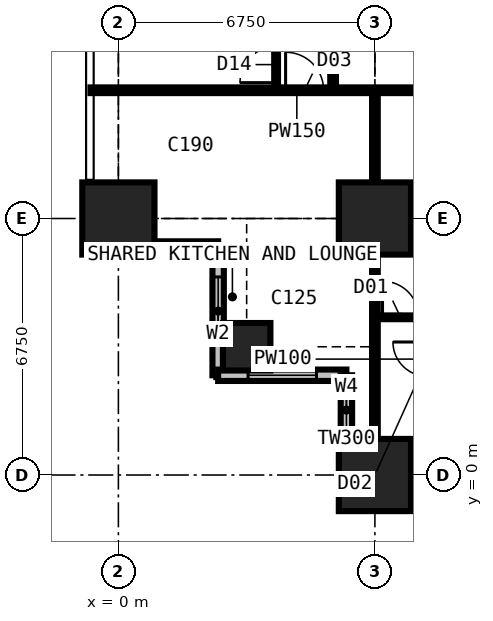
"""IFC4 building model, lengths in metres.
Left out: names, types, materials, properties, quantities, classifications, styles, units other than length and angle.
Written with IfcOpenShell. Run it as: python <this file> out.ifc"""

import sys

from ifc_helpers import new_model, si_unit, direction, frame, frame_2d, origin, origin_2d, place, context, subcontext, project, spatial, rectangle, extrude, element, fill, save


model = new_model("IFC4")
c1 = context("Model", 3, precision=1e-05, world=origin(), true_north=direction((0.0, 1.0)))
c2 = subcontext(c1, "Body", "Model", "MODEL_VIEW")
j1 = project(units=[si_unit("LENGTHUNIT", "METRE"), si_unit("PLANEANGLEUNIT", "RADIAN")], contexts=[c1])
p1 = place(None, origin())
s1 = spatial("IfcSite", under=j1, at=p1, CompositionType="ELEMENT")
p2 = place(p1, origin())
s2 = spatial("IfcBuilding", under=s1, at=p2, CompositionType="ELEMENT")
p3 = place(p2, frame((0.0, 0.0, 36.0)))
s3 = spatial("IfcBuildingStorey", under=s2, at=p3, CompositionType="ELEMENT", Elevation=36.0)
p4 = place(p3, frame((0.0, 6.75, 0.0), z_axis=(0.0, 0.0, 1.0), x_axis=(1.0, 0.0, 0.0)))
e1 = element("IfcColumn", 1, at=p4, inside=s3, PredefinedType="COLUMN", context=c2, shape_type="SweptSolid", body=[
    extrude(rectangle(XDim=1.9, YDim=1.9, at=origin_2d()), origin(), (0.0, 0.0, 1.0), 3.6),
])
p5 = place(p3, frame((3.375, 3.375, 0.0), z_axis=(0.0, 0.0, 1.0), x_axis=(1.0, 0.0, 0.0)))
e2 = element("IfcColumn", 2, at=p5, inside=s3, PredefinedType="COLUMN", context=c2, shape_type="SweptSolid", body=[
    extrude(rectangle(XDim=1.25, YDim=1.25, at=origin_2d()), origin(), (0.0, 0.0, 1.0), 3.6),
])
for number, where, z_axis, x_axis in (
    (3, (6.75, 0.0, 0.0), (0.0, 0.0, 1.0), (1.0, 0.0, 0.0)),
    (4, (6.75, 6.75, 0.0), (0.0, 0.0, 1.0), (1.0, 0.0, 0.0)),
):
    element("IfcColumn", number, at=place(p3, frame(where, z_axis=z_axis, x_axis=x_axis)), inside=s3, PredefinedType="COLUMN", context=c2, shape_type="SweptSolid", body=[
        extrude(rectangle(XDim=1.9, YDim=1.9, at=origin_2d()), origin(), (0.0, 0.0, 1.0), 3.6),
    ])
p6 = place(p3, frame((-0.75, 6.0, 0.0), z_axis=(0.0, 0.0, 1.0), x_axis=(1.0, 0.0, 0.0)))
e5 = element("IfcWall", 5, at=p6, inside=s3, PredefinedType="SOLIDWALL", context=c2, shape_type="SweptSolid", body=[
    extrude(rectangle(XDim=3.375, YDim=0.3, at=frame_2d((1.688, 0.0))), origin(), (0.0, 0.0, 1.0), 3.375),
])
p7 = place(p6, frame((1.857, 0.0, 0.9)))
e6 = element("IfcOpeningElement", 6, at=p7, cuts=e5, PredefinedType="OPENING", context=c2, shape_type="SweptSolid", body=[
    extrude(rectangle(XDim=1.2, YDim=1.8, at=frame_2d((0.6, 0.9))), frame((0.0, 0.16, 0.0), z_axis=(0.0, -1.0, 0.0), x_axis=(1.0, 0.0, 0.0)), (0.0, 0.0, 1.0), 0.32),
])
p8 = place(p3, frame((2.625, 6.0, 0.0), z_axis=(0.0, 0.0, 1.0), x_axis=(0.0, -1.0, 0.0)))
e7 = element("IfcWall", 7, at=p8, inside=s3, PredefinedType="SOLIDWALL", context=c2, shape_type="SweptSolid", body=[
    extrude(rectangle(XDim=3.375, YDim=0.3, at=frame_2d((1.688, 0.0))), origin(), (0.0, 0.0, 1.0), 3.375),
])
p9 = place(p8, frame((0.788, 0.0, 0.6)))
e8 = element("IfcOpeningElement", 8, at=p9, cuts=e7, PredefinedType="OPENING", context=c2, shape_type="SweptSolid", body=[
    extrude(rectangle(XDim=1.8, YDim=2.1, at=frame_2d((0.9, 1.05))), frame((0.0, 0.16, 0.0), z_axis=(0.0, -1.0, 0.0), x_axis=(1.0, 0.0, 0.0)), (0.0, 0.0, 1.0), 0.32),
])
p10 = place(p3, frame((2.625, 2.625, 0.0), z_axis=(0.0, 0.0, 1.0), x_axis=(1.0, 0.0, 0.0)))
e9 = element("IfcWall", 9, at=p10, inside=s3, PredefinedType="SOLIDWALL", context=c2, shape_type="SweptSolid", body=[
    extrude(rectangle(XDim=3.375, YDim=0.3, at=frame_2d((1.688, 0.0))), origin(), (0.0, 0.0, 1.0), 3.375),
])
p11 = place(p10, frame((0.788, 0.0, 0.6)))
e10 = element("IfcOpeningElement", 10, at=p11, cuts=e9, PredefinedType="OPENING", context=c2, shape_type="SweptSolid", body=[
    extrude(rectangle(XDim=1.8, YDim=2.1, at=frame_2d((0.9, 1.05))), frame((0.0, 0.16, 0.0), z_axis=(0.0, -1.0, 0.0), x_axis=(1.0, 0.0, 0.0)), (0.0, 0.0, 1.0), 0.32),
])
p12 = place(p3, frame((6.0, 2.625, 0.0), z_axis=(0.0, 0.0, 1.0), x_axis=(0.0, -1.0, 0.0)))
e11 = element("IfcWall", 11, at=p12, inside=s3, PredefinedType="SOLIDWALL", context=c2, shape_type="SweptSolid", body=[
    extrude(rectangle(XDim=3.375, YDim=0.3, at=frame_2d((1.688, 0.0))), origin(), (0.0, 0.0, 1.0), 3.375),
])
p13 = place(p12, frame((0.317, 0.0, 0.9)))
e12 = element("IfcOpeningElement", 12, at=p13, cuts=e11, PredefinedType="OPENING", context=c2, shape_type="SweptSolid", body=[
    extrude(rectangle(XDim=1.2, YDim=1.8, at=frame_2d((0.6, 0.9))), frame((0.0, 0.16, 0.0), z_axis=(0.0, -1.0, 0.0), x_axis=(1.0, 0.0, 0.0)), (0.0, 0.0, 1.0), 0.32),
])
p14 = place(p3, frame((-0.734, 10.125, 0.0), z_axis=(0.0, 0.0, 1.0), x_axis=(1.0, 0.0, 0.0)))
e13 = element("IfcWall", 13, at=p14, inside=s3, PredefinedType="PARTITIONING", context=c2, shape_type="SweptSolid", body=[
    extrude(rectangle(XDim=10.859, YDim=0.15, at=frame_2d((5.429, 0.0))), origin(), (0.0, 0.0, 1.0), 3.375),
])
p15 = place(p14, frame((5.134, 0.0, 0.0)))
e14 = element("IfcOpeningElement", 14, at=p15, cuts=e13, PredefinedType="OPENING", context=c2, shape_type="SweptSolid", body=[
    extrude(rectangle(XDim=1.0, YDim=2.2, at=frame_2d((0.5, 1.1))), frame((0.0, 0.085, 0.0), z_axis=(0.0, -1.0, 0.0), x_axis=(1.0, 0.0, 0.0)), (0.0, 0.0, 1.0), 0.17),
])
p16 = place(p3, frame((4.15, 10.125, 0.0), z_axis=(0.0, 0.0, 1.0), x_axis=(0.0, 1.0, 0.0)))
e15 = element("IfcWall", 15, at=p16, inside=s3, PredefinedType="PARTITIONING", context=c2, shape_type="SweptSolid", body=[
    extrude(rectangle(XDim=23.625, YDim=0.1, at=frame_2d((11.812, 0.0))), origin(), (0.0, 0.0, 1.0), 3.375),
])
p17 = place(p16, frame((0.2, 0.0, 0.0)))
e16 = element("IfcOpeningElement", 16, at=p17, cuts=e15, PredefinedType="OPENING", context=c2, shape_type="SweptSolid", body=[
    extrude(rectangle(XDim=0.95, YDim=2.2, at=frame_2d((0.475, 1.1))), frame((0.0, 0.06, 0.0), z_axis=(0.0, -1.0, 0.0), x_axis=(1.0, 0.0, 0.0)), (0.0, 0.0, 1.0), 0.12),
])
p18 = place(p16, frame((3.625, 0.0, 0.0)))
e17 = element("IfcOpeningElement", 17, at=p18, cuts=e15, PredefinedType="OPENING", context=c2, shape_type="SweptSolid", body=[
    extrude(rectangle(XDim=0.95, YDim=2.2, at=frame_2d((0.475, 1.1))), frame((0.0, 0.06, 0.0), z_axis=(0.0, -1.0, 0.0), x_axis=(1.0, 0.0, 0.0)), (0.0, 0.0, 1.0), 0.12),
])
p19 = place(p16, frame((7.0, 0.0, 0.0)))
e18 = element("IfcOpeningElement", 18, at=p19, cuts=e15, PredefinedType="OPENING", context=c2, shape_type="SweptSolid", body=[
    extrude(rectangle(XDim=0.95, YDim=2.2, at=frame_2d((0.475, 1.1))), frame((0.0, 0.06, 0.0), z_axis=(0.0, -1.0, 0.0), x_axis=(1.0, 0.0, 0.0)), (0.0, 0.0, 1.0), 0.12),
])
p20 = place(p16, frame((10.375, 0.0, 0.0)))
e19 = element("IfcOpeningElement", 19, at=p20, cuts=e15, PredefinedType="OPENING", context=c2, shape_type="SweptSolid", body=[
    extrude(rectangle(XDim=0.95, YDim=2.2, at=frame_2d((0.475, 1.1))), frame((0.0, 0.06, 0.0), z_axis=(0.0, -1.0, 0.0), x_axis=(1.0, 0.0, 0.0)), (0.0, 0.0, 1.0), 0.12),
])
p21 = place(p16, frame((13.75, 0.0, 0.0)))
e20 = element("IfcOpeningElement", 20, at=p21, cuts=e15, PredefinedType="OPENING", context=c2, shape_type="SweptSolid", body=[
    extrude(rectangle(XDim=0.95, YDim=2.2, at=frame_2d((0.475, 1.1))), frame((0.0, 0.06, 0.0), z_axis=(0.0, -1.0, 0.0), x_axis=(1.0, 0.0, 0.0)), (0.0, 0.0, 1.0), 0.12),
])
p22 = place(p16, frame((17.125, 0.0, 0.0)))
e21 = element("IfcOpeningElement", 21, at=p22, cuts=e15, PredefinedType="OPENING", context=c2, shape_type="SweptSolid", body=[
    extrude(rectangle(XDim=0.95, YDim=2.2, at=frame_2d((0.475, 1.1))), frame((0.0, 0.06, 0.0), z_axis=(0.0, -1.0, 0.0), x_axis=(1.0, 0.0, 0.0)), (0.0, 0.0, 1.0), 0.12),
])
p23 = place(p3, frame((5.65, 10.125, 0.0), z_axis=(0.0, 0.0, 1.0), x_axis=(0.0, 1.0, 0.0)))
e22 = element("IfcWall", 22, at=p23, inside=s3, PredefinedType="PARTITIONING", context=c2, shape_type="SweptSolid", body=[
    extrude(rectangle(XDim=10.762, YDim=0.15, at=frame_2d((5.381, 0.0))), origin(), (0.0, 0.0, 1.0), 3.375),
])
p24 = place(p23, frame((4.9, 0.0, 0.0)))
e23 = element("IfcOpeningElement", 23, at=p24, cuts=e22, PredefinedType="OPENING", context=c2, shape_type="SweptSolid", body=[
    extrude(rectangle(XDim=0.95, YDim=2.2, at=frame_2d((0.475, 1.1))), frame((0.0, 0.085, 0.0), z_axis=(0.0, -1.0, 0.0), x_axis=(1.0, 0.0, 0.0)), (0.0, 0.0, 1.0), 0.17),
])
p25 = place(p3, frame((6.75, -0.734, 0.0), z_axis=(0.0, 0.0, 1.0), x_axis=(0.0, 1.0, 0.0)))
e24 = element("IfcWall", 24, at=p25, inside=s3, PredefinedType="PARTITIONING", context=c2, shape_type="SweptSolid", body=[
    extrude(rectangle(XDim=10.859, YDim=0.15, at=frame_2d((5.429, 0.0))), origin(), (0.0, 0.0, 1.0), 2.877),
])
p26 = place(p3, frame((6.75, 4.15, 0.0), z_axis=(0.0, 0.0, 1.0), x_axis=(1.0, 0.0, 0.0)))
e25 = element("IfcWall", 25, at=p26, inside=s3, PredefinedType="PARTITIONING", context=c2, shape_type="SweptSolid", body=[
    extrude(rectangle(XDim=23.625, YDim=0.1, at=frame_2d((11.812, 0.0))), origin(), (0.0, 0.0, 1.0), 3.375),
])
p27 = place(p26, frame((0.2, 0.0, 0.0)))
e26 = element("IfcOpeningElement", 26, at=p27, cuts=e25, PredefinedType="OPENING", context=c2, shape_type="SweptSolid", body=[
    extrude(rectangle(XDim=0.95, YDim=2.2, at=frame_2d((0.475, 1.1))), frame((0.0, 0.06, 0.0), z_axis=(0.0, -1.0, 0.0), x_axis=(1.0, 0.0, 0.0)), (0.0, 0.0, 1.0), 0.12),
])
p28 = place(p26, frame((3.625, 0.0, 0.0)))
e27 = element("IfcOpeningElement", 27, at=p28, cuts=e25, PredefinedType="OPENING", context=c2, shape_type="SweptSolid", body=[
    extrude(rectangle(XDim=0.95, YDim=2.2, at=frame_2d((0.475, 1.1))), frame((0.0, 0.06, 0.0), z_axis=(0.0, -1.0, 0.0), x_axis=(1.0, 0.0, 0.0)), (0.0, 0.0, 1.0), 0.12),
])
p29 = place(p26, frame((7.0, 0.0, 0.0)))
e28 = element("IfcOpeningElement", 28, at=p29, cuts=e25, PredefinedType="OPENING", context=c2, shape_type="SweptSolid", body=[
    extrude(rectangle(XDim=0.95, YDim=2.2, at=frame_2d((0.475, 1.1))), frame((0.0, 0.06, 0.0), z_axis=(0.0, -1.0, 0.0), x_axis=(1.0, 0.0, 0.0)), (0.0, 0.0, 1.0), 0.12),
])
p30 = place(p26, frame((10.325, 0.0, 0.0)))
e29 = element("IfcOpeningElement", 29, at=p30, cuts=e25, PredefinedType="OPENING", context=c2, shape_type="SweptSolid", body=[
    extrude(rectangle(XDim=0.95, YDim=2.2, at=frame_2d((0.475, 1.1))), frame((0.0, 0.06, 0.0), z_axis=(0.0, -1.0, 0.0), x_axis=(1.0, 0.0, 0.0)), (0.0, 0.0, 1.0), 0.12),
])
p31 = place(p26, frame((13.75, 0.0, 0.0)))
e30 = element("IfcOpeningElement", 30, at=p31, cuts=e25, PredefinedType="OPENING", context=c2, shape_type="SweptSolid", body=[
    extrude(rectangle(XDim=0.95, YDim=2.2, at=frame_2d((0.475, 1.1))), frame((0.0, 0.06, 0.0), z_axis=(0.0, -1.0, 0.0), x_axis=(1.0, 0.0, 0.0)), (0.0, 0.0, 1.0), 0.12),
])
p32 = place(p26, frame((17.125, 0.0, 0.0)))
e31 = element("IfcOpeningElement", 31, at=p32, cuts=e25, PredefinedType="OPENING", context=c2, shape_type="SweptSolid", body=[
    extrude(rectangle(XDim=0.95, YDim=2.2, at=frame_2d((0.475, 1.1))), frame((0.0, 0.06, 0.0), z_axis=(0.0, -1.0, 0.0), x_axis=(1.0, 0.0, 0.0)), (0.0, 0.0, 1.0), 0.12),
])
p33 = place(p26, frame((20.5, 0.0, 0.0)))
e32 = element("IfcOpeningElement", 32, at=p33, cuts=e25, PredefinedType="OPENING", context=c2, shape_type="SweptSolid", body=[
    extrude(rectangle(XDim=0.95, YDim=2.2, at=frame_2d((0.475, 1.1))), frame((0.0, 0.06, 0.0), z_axis=(0.0, -1.0, 0.0), x_axis=(1.0, 0.0, 0.0)), (0.0, 0.0, 1.0), 0.12),
])
p34 = place(p7, origin())
e33 = element("IfcWindow", 33, at=p34, inside=s3, PartitioningType="SINGLE_PANEL", PredefinedType="WINDOW", context=c2, shape_type="SweptSolid", body=[
    extrude(rectangle(XDim=1.2, YDim=1.8, at=frame_2d((0.6, 0.9))), frame((0.0, 0.03, 0.0), z_axis=(0.0, -1.0, 0.0), x_axis=(1.0, 0.0, 0.0)), (0.0, 0.0, 1.0), 0.06),
])
fill(e6, e33)
p35 = place(p9, origin())
e34 = element("IfcWindow", 34, at=p35, inside=s3, PartitioningType="SINGLE_PANEL", PredefinedType="WINDOW", context=c2, shape_type="SweptSolid", body=[
    extrude(rectangle(XDim=1.8, YDim=2.1, at=frame_2d((0.9, 1.05))), frame((0.0, 0.03, 0.0), z_axis=(0.0, -1.0, 0.0), x_axis=(1.0, 0.0, 0.0)), (0.0, 0.0, 1.0), 0.06),
])
fill(e8, e34)
p36 = place(p11, origin())
e35 = element("IfcWindow", 35, at=p36, inside=s3, PartitioningType="SINGLE_PANEL", PredefinedType="WINDOW", context=c2, shape_type="SweptSolid", body=[
    extrude(rectangle(XDim=1.8, YDim=2.1, at=frame_2d((0.9, 1.05))), frame((0.0, 0.03, 0.0), z_axis=(0.0, -1.0, 0.0), x_axis=(1.0, 0.0, 0.0)), (0.0, 0.0, 1.0), 0.06),
])
fill(e10, e35)
p37 = place(p13, origin())
e36 = element("IfcWindow", 36, at=p37, inside=s3, PartitioningType="SINGLE_PANEL", PredefinedType="WINDOW", context=c2, shape_type="SweptSolid", body=[
    extrude(rectangle(XDim=1.2, YDim=1.8, at=frame_2d((0.6, 0.9))), frame((0.0, 0.03, 0.0), z_axis=(0.0, -1.0, 0.0), x_axis=(1.0, 0.0, 0.0)), (0.0, 0.0, 1.0), 0.06),
])
fill(e12, e36)
p38 = place(p15, origin())
e37 = element("IfcDoor", 37, at=p38, inside=s3, OperationType="SINGLE_SWING_LEFT", PredefinedType="DOOR", context=c2, shape_type="SweptSolid", body=[
    extrude(rectangle(XDim=1.0, YDim=2.2, at=frame_2d((0.5, 1.1))), frame((0.0, 0.025, 0.0), z_axis=(0.0, -1.0, 0.0), x_axis=(1.0, 0.0, 0.0)), (0.0, 0.0, 1.0), 0.05),
])
fill(e14, e37)
p39 = place(p27, origin())
e38 = element("IfcDoor", 38, at=p39, inside=s3, OperationType="SINGLE_SWING_LEFT", PredefinedType="DOOR", context=c2, shape_type="SweptSolid", body=[
    extrude(rectangle(XDim=0.95, YDim=2.2, at=frame_2d((0.475, 1.1))), frame((0.0, 0.025, 0.0), z_axis=(0.0, -1.0, 0.0), x_axis=(1.0, 0.0, 0.0)), (0.0, 0.0, 1.0), 0.05),
])
fill(e26, e38)
p40 = place(p17, origin())
e39 = element("IfcDoor", 39, at=p40, inside=s3, OperationType="SINGLE_SWING_LEFT", PredefinedType="DOOR", context=c2, shape_type="SweptSolid", body=[
    extrude(rectangle(XDim=0.95, YDim=2.2, at=frame_2d((0.475, 1.1))), frame((0.0, 0.025, 0.0), z_axis=(0.0, -1.0, 0.0), x_axis=(1.0, 0.0, 0.0)), (0.0, 0.0, 1.0), 0.05),
])
fill(e16, e39)
save(model, sys.argv[1])
